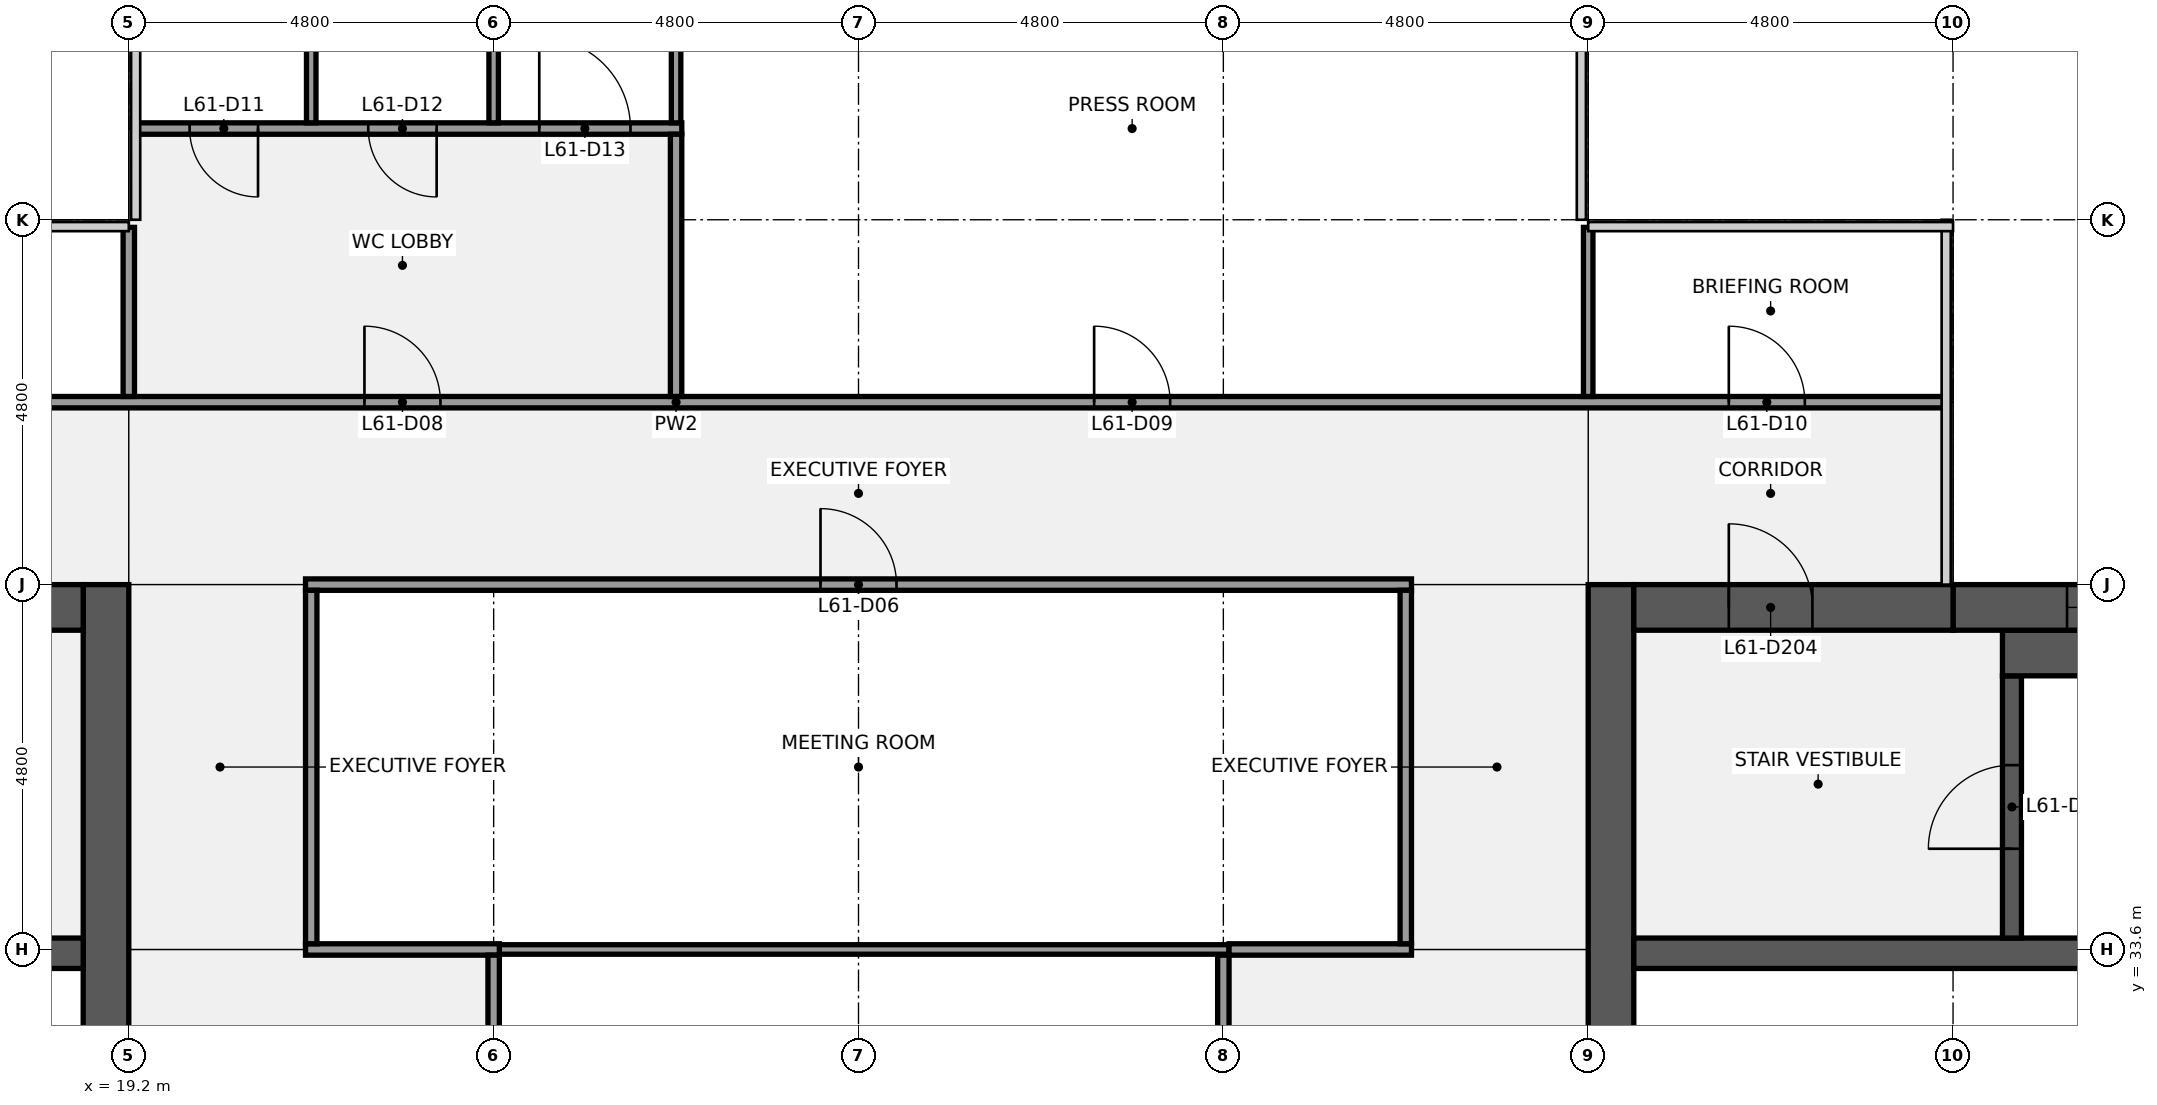
"""IFC4 building model, lengths in metres.
Left out: names, types, materials, properties, quantities, classifications, styles, units other than length and angle.
Written with IfcOpenShell. Run it as: python <this file> out.ifc"""

import sys

from ifc_helpers import new_model, si_unit, direction, frame, frame_2d, origin, place, context, subcontext, project, spatial, rectangle, extrude, element, fill, save


model = new_model("IFC4")
c1 = context("Model", 3, precision=1e-05, world=origin(), true_north=direction((0.0, 1.0)))
c2 = subcontext(c1, "Body", "Model", "MODEL_VIEW")
j1 = project(units=[si_unit("LENGTHUNIT", "METRE"), si_unit("PLANEANGLEUNIT", "RADIAN")], contexts=[c1])
p1 = place(None, origin())
s1 = spatial("IfcSite", under=j1, at=p1, CompositionType="ELEMENT")
p2 = place(p1, origin())
s2 = spatial("IfcBuilding", under=s1, at=p2, CompositionType="ELEMENT")
p3 = place(p2, frame((0.0, 0.0, 282.3)))
s3 = spatial("IfcBuildingStorey", under=s2, at=p3, CompositionType="ELEMENT", Elevation=282.3)
p4 = place(p3, frame((18.9, 38.4, 0.0), z_axis=(0.0, 0.0, 1.0), x_axis=(0.0, -1.0, 0.0)))
e1 = element("IfcWall", 1, at=p4, inside=s3, PredefinedType="SHEAR", context=c2, shape_type="SweptSolid", body=[
    extrude(rectangle(XDim=28.8, YDim=0.6, at=frame_2d((14.4, 0.0))), origin(), (0.0, 0.0, 1.0), 3.84),
])
p5 = place(p4, frame((18.3, 0.0, 0.0)))
e2 = element("IfcOpeningElement", 2, at=p5, cuts=e1, PredefinedType="OPENING", context=c2, shape_type="SweptSolid", body=[
    extrude(rectangle(XDim=1.8, YDim=2.1, at=frame_2d((0.9, 1.05))), frame((0.0, 0.31, 0.0), z_axis=(0.0, -1.0, 0.0), x_axis=(1.0, 0.0, 0.0)), (0.0, 0.0, 1.0), 0.62),
])
p6 = place(p4, frame((8.7, 0.0, 0.0)))
e3 = element("IfcOpeningElement", 3, at=p6, cuts=e1, PredefinedType="OPENING", context=c2, shape_type="SweptSolid", body=[
    extrude(rectangle(XDim=1.8, YDim=2.1, at=frame_2d((0.9, 1.05))), frame((0.0, 0.31, 0.0), z_axis=(0.0, -1.0, 0.0), x_axis=(1.0, 0.0, 0.0)), (0.0, 0.0, 1.0), 0.62),
])
p7 = place(p3, frame((0.6, 33.55, 0.0), z_axis=(0.0, 0.0, 1.0), x_axis=(1.0, 0.0, 0.0)))
e4 = element("IfcWall", 4, at=p7, inside=s3, PredefinedType="SHEAR", context=c2, shape_type="SweptSolid", body=[
    extrude(rectangle(XDim=18.0, YDim=0.4, at=frame_2d((9.0, 0.0))), origin(), (0.0, 0.0, 1.0), 3.84),
])
p8 = place(p3, frame((9.6, 38.1, 0.0), z_axis=(0.0, 0.0, 1.0), x_axis=(1.0, 0.0, 0.0)))
e5 = element("IfcWall", 5, at=p8, inside=s3, PredefinedType="SHEAR", context=c2, shape_type="SweptSolid", body=[
    extrude(rectangle(XDim=9.0, YDim=0.6, at=frame_2d((4.5, 0.0))), origin(), (0.0, 0.0, 1.0), 3.84),
])
p9 = place(p8, frame((6.65, 0.0, 0.0)))
e6 = element("IfcOpeningElement", 6, at=p9, cuts=e5, PredefinedType="OPENING", context=c2, shape_type="SweptSolid", body=[
    extrude(rectangle(XDim=1.1, YDim=2.1, at=frame_2d((0.55, 1.05))), frame((0.0, 0.31, 0.0), z_axis=(0.0, -1.0, 0.0), x_axis=(1.0, 0.0, 0.0)), (0.0, 0.0, 1.0), 0.62),
])
p10 = place(p3, frame((38.7, 9.6, 0.0), z_axis=(0.0, 0.0, 1.0), x_axis=(0.0, 1.0, 0.0)))
e7 = element("IfcWall", 7, at=p10, inside=s3, PredefinedType="SHEAR", context=c2, shape_type="SweptSolid", body=[
    extrude(rectangle(XDim=28.8, YDim=0.6, at=frame_2d((14.4, 0.0))), origin(), (0.0, 0.0, 1.0), 3.84),
])
p11 = place(p10, frame((8.7, 0.0, 0.0)))
e8 = element("IfcOpeningElement", 8, at=p11, cuts=e7, PredefinedType="OPENING", context=c2, shape_type="SweptSolid", body=[
    extrude(rectangle(XDim=1.8, YDim=2.1, at=frame_2d((0.9, 1.05))), frame((0.0, 0.31, 0.0), z_axis=(0.0, -1.0, 0.0), x_axis=(1.0, 0.0, 0.0)), (0.0, 0.0, 1.0), 0.62),
])
p12 = place(p10, frame((18.3, 0.0, 0.0)))
e9 = element("IfcOpeningElement", 9, at=p12, cuts=e7, PredefinedType="OPENING", context=c2, shape_type="SweptSolid", body=[
    extrude(rectangle(XDim=1.8, YDim=2.1, at=frame_2d((0.9, 1.05))), frame((0.0, 0.31, 0.0), z_axis=(0.0, -1.0, 0.0), x_axis=(1.0, 0.0, 0.0)), (0.0, 0.0, 1.0), 0.62),
])
p13 = place(p3, frame((39.0, 33.55, 0.0), z_axis=(0.0, 0.0, 1.0), x_axis=(1.0, 0.0, 0.0)))
e10 = element("IfcWall", 10, at=p13, inside=s3, PredefinedType="SHEAR", context=c2, shape_type="SweptSolid", body=[
    extrude(rectangle(XDim=18.0, YDim=0.4, at=frame_2d((9.0, 0.0))), origin(), (0.0, 0.0, 1.0), 3.84),
])
p14 = place(p3, frame((43.975, 33.75, 0.0), z_axis=(0.0, 0.0, 1.0), x_axis=(0.0, 1.0, 0.0)))
e11 = element("IfcWall", 11, at=p14, inside=s3, PredefinedType="SHEAR", context=c2, shape_type="SweptSolid", body=[
    extrude(rectangle(XDim=3.45, YDim=0.25, at=frame_2d((1.725, 0.0))), origin(), (0.0, 0.0, 1.0), 3.84),
])
p15 = place(p14, frame((1.175, 0.0, 0.0)))
e12 = element("IfcOpeningElement", 12, at=p15, cuts=e11, PredefinedType="OPENING", context=c2, shape_type="SweptSolid", body=[
    extrude(rectangle(XDim=1.1, YDim=2.1, at=frame_2d((0.55, 1.05))), frame((0.0, 0.135, 0.0), z_axis=(0.0, -1.0, 0.0), x_axis=(1.0, 0.0, 0.0)), (0.0, 0.0, 1.0), 0.27),
])
p16 = place(p3, frame((43.85, 37.5, 0.0), z_axis=(0.0, 0.0, 1.0), x_axis=(1.0, 0.0, 0.0)))
e13 = element("IfcWall", 13, at=p16, inside=s3, PredefinedType="SHEAR", context=c2, shape_type="SweptSolid", body=[
    extrude(rectangle(XDim=7.5, YDim=0.6, at=frame_2d((3.75, 0.0))), origin(), (0.0, 0.0, 1.0), 3.84),
])
p17 = place(p3, frame((43.2, 38.1, 0.0), z_axis=(0.0, 0.0, 1.0), x_axis=(1.0, 0.0, 0.0)))
e14 = element("IfcWall", 14, at=p17, inside=s3, PredefinedType="SHEAR", context=c2, shape_type="SweptSolid", body=[
    extrude(rectangle(XDim=13.8, YDim=0.6, at=frame_2d((6.9, 0.0))), origin(), (0.0, 0.0, 1.0), 3.84),
])
p18 = place(p17, frame((6.3, 0.0, 0.9)))
e15 = element("IfcOpeningElement", 15, at=p18, cuts=e14, PredefinedType="OPENING", context=c2, shape_type="SweptSolid", body=[
    extrude(rectangle(XDim=1.8, YDim=1.5, at=frame_2d((0.9, 0.75))), frame((0.0, 0.31, 0.0), z_axis=(0.0, -1.0, 0.0), x_axis=(1.0, 0.0, 0.0)), (0.0, 0.0, 1.0), 0.62),
])
p19 = place(p17, frame((1.5, 0.0, 0.9)))
e16 = element("IfcOpeningElement", 16, at=p19, cuts=e14, PredefinedType="OPENING", context=c2, shape_type="SweptSolid", body=[
    extrude(rectangle(XDim=1.8, YDim=1.5, at=frame_2d((0.9, 0.75))), frame((0.0, 0.31, 0.0), z_axis=(0.0, -1.0, 0.0), x_axis=(1.0, 0.0, 0.0)), (0.0, 0.0, 1.0), 0.62),
])
p20 = place(p3, frame((39.0, 38.1, 0.0), z_axis=(0.0, 0.0, 1.0), x_axis=(1.0, 0.0, 0.0)))
e17 = element("IfcWall", 17, at=p20, inside=s3, PredefinedType="SHEAR", context=c2, shape_type="SweptSolid", body=[
    extrude(rectangle(XDim=4.2, YDim=0.6, at=frame_2d((2.1, 0.0))), origin(), (0.0, 0.0, 1.0), 3.84),
])
p21 = place(p20, frame((1.25, 0.0, 0.0)))
e18 = element("IfcOpeningElement", 18, at=p21, cuts=e17, PredefinedType="OPENING", context=c2, shape_type="SweptSolid", body=[
    extrude(rectangle(XDim=1.1, YDim=2.1, at=frame_2d((0.55, 1.05))), frame((0.0, 0.31, 0.0), z_axis=(0.0, -1.0, 0.0), x_axis=(1.0, 0.0, 0.0)), (0.0, 0.0, 1.0), 0.62),
])
p22 = place(p3, frame((24.075, 33.6, 0.0), z_axis=(0.0, 0.0, 1.0), x_axis=(1.0, 0.0, 0.0)))
e19 = element("IfcWall", 19, at=p22, inside=s3, PredefinedType="PARTITIONING", context=c2, shape_type="SweptSolid", body=[
    extrude(rectangle(XDim=9.6, YDim=0.125, at=frame_2d((4.8, 0.0))), origin(), (0.0, 0.0, 1.0), 2.87),
])
p23 = place(p3, frame((21.525, 33.6, 0.0), z_axis=(0.0, 0.0, 1.0), x_axis=(1.0, 0.0, 0.0)))
e20 = element("IfcWall", 20, at=p23, inside=s3, PredefinedType="PARTITIONING", context=c2, shape_type="SweptSolid", body=[
    extrude(rectangle(XDim=2.55, YDim=0.15, at=frame_2d((1.275, 0.0))), origin(), (0.0, 0.0, 1.0), 2.87),
])
p24 = place(p3, frame((33.675, 33.6, 0.0), z_axis=(0.0, 0.0, 1.0), x_axis=(1.0, 0.0, 0.0)))
e21 = element("IfcWall", 21, at=p24, inside=s3, PredefinedType="PARTITIONING", context=c2, shape_type="SweptSolid", body=[
    extrude(rectangle(XDim=2.4, YDim=0.15, at=frame_2d((1.2, 0.0))), origin(), (0.0, 0.0, 1.0), 2.87),
])
p25 = place(p3, frame((21.525, 38.4, 0.0), z_axis=(0.0, 0.0, 1.0), x_axis=(1.0, 0.0, 0.0)))
e22 = element("IfcWall", 22, at=p25, inside=s3, PredefinedType="PARTITIONING", context=c2, shape_type="SweptSolid", body=[
    extrude(rectangle(XDim=14.55, YDim=0.15, at=frame_2d((7.275, 0.0))), origin(), (0.0, 0.0, 1.0), 2.87),
])
p26 = place(p25, frame((6.775, 0.0, 0.0)))
e23 = element("IfcOpeningElement", 23, at=p26, cuts=e22, PredefinedType="OPENING", context=c2, shape_type="SweptSolid", body=[
    extrude(rectangle(XDim=1.0, YDim=2.1, at=frame_2d((0.5, 1.05))), frame((0.0, 0.085, 0.0), z_axis=(0.0, -1.0, 0.0), x_axis=(1.0, 0.0, 0.0)), (0.0, 0.0, 1.0), 0.17),
])
p27 = place(p3, frame((9.7, 40.8, 0.0), z_axis=(0.0, 0.0, 1.0), x_axis=(1.0, 0.0, 0.0)))
e24 = element("IfcWall", 24, at=p27, inside=s3, PredefinedType="PARTITIONING", context=c2, shape_type="SweptSolid", body=[
    extrude(rectangle(XDim=33.4, YDim=0.15, at=frame_2d((16.7, 0.0))), origin(), (0.0, 0.0, 1.0), 2.87),
])
p28 = place(p27, frame((4.25, 0.0, 0.0)))
e25 = element("IfcOpeningElement", 25, at=p28, cuts=e24, PredefinedType="OPENING", context=c2, shape_type="SweptSolid", body=[
    extrude(rectangle(XDim=1.0, YDim=2.1, at=frame_2d((0.5, 1.05))), frame((0.0, 0.085, 0.0), z_axis=(0.0, -1.0, 0.0), x_axis=(1.0, 0.0, 0.0)), (0.0, 0.0, 1.0), 0.17),
])
p29 = place(p27, frame((12.6, 0.0, 0.0)))
e26 = element("IfcOpeningElement", 26, at=p29, cuts=e24, PredefinedType="OPENING", context=c2, shape_type="SweptSolid", body=[
    extrude(rectangle(XDim=1.0, YDim=2.1, at=frame_2d((0.5, 1.05))), frame((0.0, 0.085, 0.0), z_axis=(0.0, -1.0, 0.0), x_axis=(1.0, 0.0, 0.0)), (0.0, 0.0, 1.0), 0.17),
])
p30 = place(p27, frame((22.2, 0.0, 0.0)))
e27 = element("IfcOpeningElement", 27, at=p30, cuts=e24, PredefinedType="OPENING", context=c2, shape_type="SweptSolid", body=[
    extrude(rectangle(XDim=1.0, YDim=2.1, at=frame_2d((0.5, 1.05))), frame((0.0, 0.085, 0.0), z_axis=(0.0, -1.0, 0.0), x_axis=(1.0, 0.0, 0.0)), (0.0, 0.0, 1.0), 0.17),
])
p31 = place(p27, frame((30.55, 0.0, 0.0)))
e28 = element("IfcOpeningElement", 28, at=p31, cuts=e24, PredefinedType="OPENING", context=c2, shape_type="SweptSolid", body=[
    extrude(rectangle(XDim=1.0, YDim=2.1, at=frame_2d((0.5, 1.05))), frame((0.0, 0.085, 0.0), z_axis=(0.0, -1.0, 0.0), x_axis=(1.0, 0.0, 0.0)), (0.0, 0.0, 1.0), 0.17),
])
p32 = place(p3, frame((19.3, 44.4, 0.0), z_axis=(0.0, 0.0, 1.0), x_axis=(1.0, 0.0, 0.0)))
e29 = element("IfcWall", 29, at=p32, inside=s3, PredefinedType="PARTITIONING", context=c2, shape_type="SweptSolid", body=[
    extrude(rectangle(XDim=7.175, YDim=0.15, at=frame_2d((3.587, 0.0))), origin(), (0.0, 0.0, 1.0), 2.87),
])
p33 = place(p32, frame((0.7, 0.0, 0.0)))
e30 = element("IfcOpeningElement", 30, at=p33, cuts=e29, PredefinedType="OPENING", context=c2, shape_type="SweptSolid", body=[
    extrude(rectangle(XDim=0.9, YDim=2.1, at=frame_2d((0.45, 1.05))), frame((0.0, 0.085, 0.0), z_axis=(0.0, -1.0, 0.0), x_axis=(1.0, 0.0, 0.0)), (0.0, 0.0, 1.0), 0.17),
])
p34 = place(p32, frame((3.05, 0.0, 0.0)))
e31 = element("IfcOpeningElement", 31, at=p34, cuts=e29, PredefinedType="OPENING", context=c2, shape_type="SweptSolid", body=[
    extrude(rectangle(XDim=0.9, YDim=2.1, at=frame_2d((0.45, 1.05))), frame((0.0, 0.085, 0.0), z_axis=(0.0, -1.0, 0.0), x_axis=(1.0, 0.0, 0.0)), (0.0, 0.0, 1.0), 0.17),
])
p35 = place(p32, frame((5.3, 0.0, 0.0)))
e32 = element("IfcOpeningElement", 32, at=p35, cuts=e29, PredefinedType="OPENING", context=c2, shape_type="SweptSolid", body=[
    extrude(rectangle(XDim=1.2, YDim=2.1, at=frame_2d((0.6, 1.05))), frame((0.0, 0.085, 0.0), z_axis=(0.0, -1.0, 0.0), x_axis=(1.0, 0.0, 0.0)), (0.0, 0.0, 1.0), 0.17),
])
p36 = place(p3, frame((19.2, 40.875, 0.0), z_axis=(0.0, 0.0, 1.0), x_axis=(0.0, 1.0, 0.0)))
e33 = element("IfcWall", 33, at=p36, inside=s3, PredefinedType="PARTITIONING", context=c2, shape_type="SweptSolid", body=[
    extrude(rectangle(XDim=2.225, YDim=0.15, at=frame_2d((1.113, 0.0))), origin(), (0.0, 0.0, 1.0), 2.87),
])
p37 = place(p3, frame((21.6, 44.475, 0.0), z_axis=(0.0, 0.0, 1.0), x_axis=(0.0, 1.0, 0.0)))
e34 = element("IfcWall", 34, at=p37, inside=s3, PredefinedType="PARTITIONING", context=c2, shape_type="SweptSolid", body=[
    extrude(rectangle(XDim=3.425, YDim=0.125, at=frame_2d((1.712, 0.0))), origin(), (0.0, 0.0, 1.0), 2.87),
])
p38 = place(p3, frame((21.6, 33.675, 0.0), z_axis=(0.0, 0.0, 1.0), x_axis=(0.0, 1.0, 0.0)))
e35 = element("IfcWall", 35, at=p38, inside=s3, PredefinedType="PARTITIONING", context=c2, shape_type="SweptSolid", body=[
    extrude(rectangle(XDim=4.65, YDim=0.15, at=frame_2d((2.325, 0.0))), origin(), (0.0, 0.0, 1.0), 2.87),
])
p39 = place(p3, frame((24.0, 44.475, 0.0), z_axis=(0.0, 0.0, 1.0), x_axis=(0.0, 1.0, 0.0)))
e36 = element("IfcWall", 36, at=p39, inside=s3, PredefinedType="PARTITIONING", context=c2, shape_type="SweptSolid", body=[
    extrude(rectangle(XDim=3.425, YDim=0.125, at=frame_2d((1.712, 0.0))), origin(), (0.0, 0.0, 1.0), 2.87),
])
p40 = place(p3, frame((24.0, 28.875, 0.0), z_axis=(0.0, 0.0, 1.0), x_axis=(0.0, 1.0, 0.0)))
e37 = element("IfcWall", 37, at=p40, inside=s3, PredefinedType="PARTITIONING", context=c2, shape_type="SweptSolid", body=[
    extrude(rectangle(XDim=4.65, YDim=0.15, at=frame_2d((2.325, 0.0))), origin(), (0.0, 0.0, 1.0), 2.87),
])
p41 = place(p3, frame((26.4, 44.475, 0.0), z_axis=(0.0, 0.0, 1.0), x_axis=(0.0, 1.0, 0.0)))
e38 = element("IfcWall", 38, at=p41, inside=s3, PredefinedType="PARTITIONING", context=c2, shape_type="SweptSolid", body=[
    extrude(rectangle(XDim=3.425, YDim=0.125, at=frame_2d((1.712, 0.0))), origin(), (0.0, 0.0, 1.0), 2.87),
])
p42 = place(p3, frame((26.4, 40.875, 0.0), z_axis=(0.0, 0.0, 1.0), x_axis=(0.0, 1.0, 0.0)))
e39 = element("IfcWall", 39, at=p42, inside=s3, PredefinedType="PARTITIONING", context=c2, shape_type="SweptSolid", body=[
    extrude(rectangle(XDim=3.45, YDim=0.15, at=frame_2d((1.725, 0.0))), origin(), (0.0, 0.0, 1.0), 2.87),
])
for number, where, z_axis, x_axis in (
    (40, (33.6, 28.875, 0.0), (0.0, 0.0, 1.0), (0.0, 1.0, 0.0)),
    (41, (36.0, 33.675, 0.0), (0.0, 0.0, 1.0), (0.0, 1.0, 0.0)),
):
    element("IfcWall", number, at=place(p3, frame(where, z_axis=z_axis, x_axis=x_axis)), inside=s3, PredefinedType="PARTITIONING", context=c2, shape_type="SweptSolid", body=[
        extrude(rectangle(XDim=4.65, YDim=0.15, at=frame_2d((2.325, 0.0))), origin(), (0.0, 0.0, 1.0), 2.87),
    ])
p43 = place(p3, frame((38.4, 40.875, 0.0), z_axis=(0.0, 0.0, 1.0), x_axis=(0.0, 1.0, 0.0)))
e42 = element("IfcWall", 42, at=p43, inside=s3, PredefinedType="PARTITIONING", context=c2, shape_type="SweptSolid", body=[
    extrude(rectangle(XDim=2.225, YDim=0.125, at=frame_2d((1.113, 0.0))), origin(), (0.0, 0.0, 1.0), 2.87),
])
p44 = place(p15, origin())
e43 = element("IfcDoor", 43, at=p44, inside=s3, OperationType="SINGLE_SWING_LEFT", PredefinedType="DOOR", context=c2, shape_type="SweptSolid", body=[
    extrude(rectangle(XDim=1.1, YDim=2.1, at=frame_2d((0.55, 1.05))), frame((0.0, 0.025, 0.0), z_axis=(0.0, -1.0, 0.0), x_axis=(1.0, 0.0, 0.0)), (0.0, 0.0, 1.0), 0.05),
])
fill(e12, e43)
p45 = place(p21, origin())
e44 = element("IfcDoor", 44, at=p45, inside=s3, OperationType="SINGLE_SWING_LEFT", PredefinedType="DOOR", context=c2, shape_type="SweptSolid", body=[
    extrude(rectangle(XDim=1.1, YDim=2.1, at=frame_2d((0.55, 1.05))), frame((0.0, 0.025, 0.0), z_axis=(0.0, -1.0, 0.0), x_axis=(1.0, 0.0, 0.0)), (0.0, 0.0, 1.0), 0.05),
])
fill(e18, e44)
p46 = place(p19, origin())
e45 = element("IfcWindow", 45, at=p46, inside=s3, PartitioningType="SINGLE_PANEL", PredefinedType="WINDOW", context=c2, shape_type="SweptSolid", body=[
    extrude(rectangle(XDim=1.8, YDim=1.5, at=frame_2d((0.9, 0.75))), frame((0.0, 0.03, 0.0), z_axis=(0.0, -1.0, 0.0), x_axis=(1.0, 0.0, 0.0)), (0.0, 0.0, 1.0), 0.06),
])
fill(e16, e45)
p47 = place(p26, origin())
e46 = element("IfcDoor", 46, at=p47, inside=s3, OperationType="SINGLE_SWING_LEFT", PredefinedType="DOOR", context=c2, shape_type="SweptSolid", body=[
    extrude(rectangle(XDim=1.0, YDim=2.1, at=frame_2d((0.5, 1.05))), frame((0.0, 0.025, 0.0), z_axis=(0.0, -1.0, 0.0), x_axis=(1.0, 0.0, 0.0)), (0.0, 0.0, 1.0), 0.05),
])
fill(e23, e46)
p48 = place(p29, origin())
e47 = element("IfcDoor", 47, at=p48, inside=s3, OperationType="SINGLE_SWING_LEFT", PredefinedType="DOOR", context=c2, shape_type="SweptSolid", body=[
    extrude(rectangle(XDim=1.0, YDim=2.1, at=frame_2d((0.5, 1.05))), frame((0.0, 0.025, 0.0), z_axis=(0.0, -1.0, 0.0), x_axis=(1.0, 0.0, 0.0)), (0.0, 0.0, 1.0), 0.05),
])
fill(e26, e47)
p49 = place(p30, origin())
e48 = element("IfcDoor", 48, at=p49, inside=s3, OperationType="SINGLE_SWING_LEFT", PredefinedType="DOOR", context=c2, shape_type="SweptSolid", body=[
    extrude(rectangle(XDim=1.0, YDim=2.1, at=frame_2d((0.5, 1.05))), frame((0.0, 0.025, 0.0), z_axis=(0.0, -1.0, 0.0), x_axis=(1.0, 0.0, 0.0)), (0.0, 0.0, 1.0), 0.05),
])
fill(e27, e48)
p50 = place(p31, origin())
e49 = element("IfcDoor", 49, at=p50, inside=s3, OperationType="SINGLE_SWING_LEFT", PredefinedType="DOOR", context=c2, shape_type="SweptSolid", body=[
    extrude(rectangle(XDim=1.0, YDim=2.1, at=frame_2d((0.5, 1.05))), frame((0.0, 0.025, 0.0), z_axis=(0.0, -1.0, 0.0), x_axis=(1.0, 0.0, 0.0)), (0.0, 0.0, 1.0), 0.05),
])
fill(e28, e49)
p51 = place(p33, origin())
e50 = element("IfcDoor", 50, at=p51, inside=s3, OperationType="SINGLE_SWING_RIGHT", PredefinedType="DOOR", context=c2, shape_type="SweptSolid", body=[
    extrude(rectangle(XDim=0.9, YDim=2.1, at=frame_2d((0.45, 1.05))), frame((0.0, 0.025, 0.0), z_axis=(0.0, -1.0, 0.0), x_axis=(1.0, 0.0, 0.0)), (0.0, 0.0, 1.0), 0.05),
])
fill(e30, e50)
p52 = place(p34, origin())
e51 = element("IfcDoor", 51, at=p52, inside=s3, OperationType="SINGLE_SWING_RIGHT", PredefinedType="DOOR", context=c2, shape_type="SweptSolid", body=[
    extrude(rectangle(XDim=0.9, YDim=2.1, at=frame_2d((0.45, 1.05))), frame((0.0, 0.025, 0.0), z_axis=(0.0, -1.0, 0.0), x_axis=(1.0, 0.0, 0.0)), (0.0, 0.0, 1.0), 0.05),
])
fill(e31, e51)
p53 = place(p35, origin())
e52 = element("IfcDoor", 52, at=p53, inside=s3, OperationType="SINGLE_SWING_LEFT", PredefinedType="DOOR", context=c2, shape_type="SweptSolid", body=[
    extrude(rectangle(XDim=1.2, YDim=2.1, at=frame_2d((0.6, 1.05))), frame((0.0, 0.025, 0.0), z_axis=(0.0, -1.0, 0.0), x_axis=(1.0, 0.0, 0.0)), (0.0, 0.0, 1.0), 0.05),
])
fill(e32, e52)
save(model, sys.argv[1])
